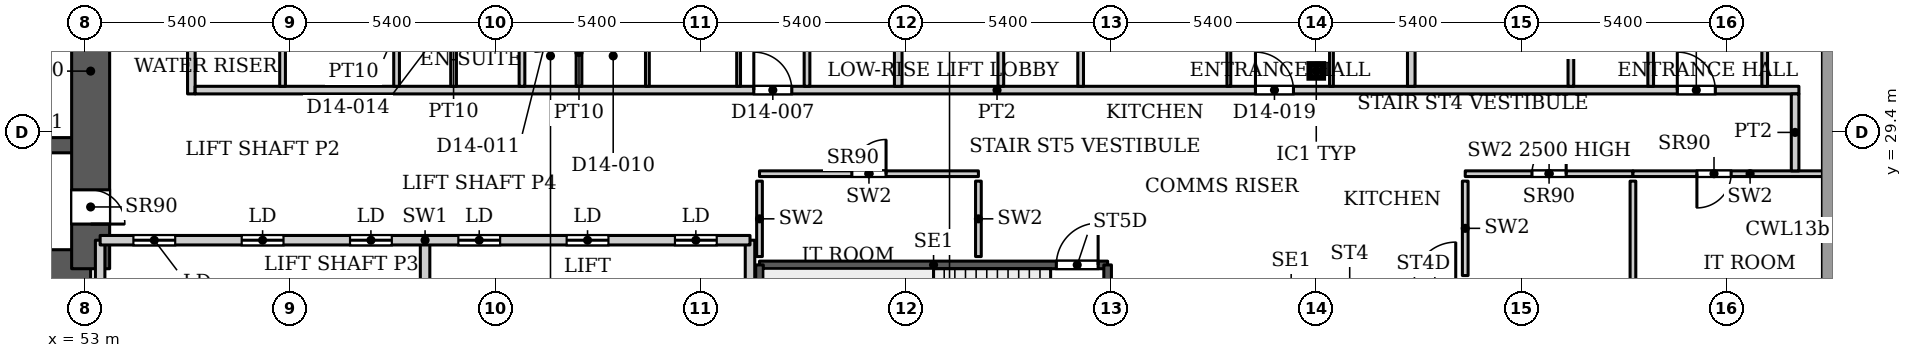
"""IFC4 building model, lengths in metres.
Left out: names, types, materials, properties, quantities, classifications, styles, units other than length and angle.
Written with IfcOpenShell. Run it as: python <this file> out.ifc"""

import sys

from ifc_helpers import new_model, si_unit, direction, frame, frame_2d, origin, origin_2d, place, context, subcontext, project, spatial, rectangle, hollow_rectangle, extrude, source, transform, mapped, element, fill, save


model = new_model("IFC4")
c1 = context("Model", 3, precision=1e-05, world=origin(), true_north=direction((0.0, 1.0)))
c2 = subcontext(c1, "Body", "Model", "MODEL_VIEW")
j1 = project(units=[si_unit("LENGTHUNIT", "METRE"), si_unit("PLANEANGLEUNIT", "RADIAN")], contexts=[c1])
p1 = place(None, origin())
s1 = spatial("IfcSite", under=j1, at=p1, CompositionType="ELEMENT")
p2 = place(p1, origin())
s2 = spatial("IfcBuilding", under=s1, at=p2, CompositionType="ELEMENT")
p3 = place(p2, frame((0.0, 0.0, 69.5)))
s3 = spatial("IfcBuildingStorey", under=s2, at=p3, CompositionType="ELEMENT", Elevation=69.5)
p4 = place(p3, frame((85.4, 31.005, 0.0), z_axis=(0.0, 0.0, 1.0), x_axis=(1.0, 0.0, 0.0)))
e1 = element("IfcColumn", 1, at=p4, inside=s3, PredefinedType="COLUMN", context=c2, shape_type="SweptSolid", body=[
    extrude(hollow_rectangle(XDim=0.356, YDim=0.356, WallThickness=0.016, InnerFilletRadius=0.016, OuterFilletRadius=0.032, at=origin_2d()), origin(), (0.0, 0.0, 1.0), 3.9),
])
p5 = place(p3, frame((34.75, 25.8, 0.0), z_axis=(0.0, 0.0, 1.0), x_axis=(1.0, 0.0, 0.0)))
e2 = element("IfcWall", 2, at=p5, inside=s3, PredefinedType="SHEAR", context=c2, shape_type="SweptSolid", body=[
    extrude(rectangle(XDim=18.4, YDim=1.0, at=frame_2d((9.2, 0.0))), origin(), (0.0, 0.0, 1.0), 3.9),
])
p6 = place(p3, frame((34.75, 29.05, 0.0), z_axis=(0.0, 0.0, 1.0), x_axis=(1.0, 0.0, 0.0)))
e3 = element("IfcWall", 3, at=p6, inside=s3, PredefinedType="SHEAR", context=c2, shape_type="SweptSolid", body=[
    extrude(rectangle(XDim=18.4, YDim=0.4, at=frame_2d((9.2, 0.0))), origin(), (0.0, 0.0, 1.0), 3.9),
])
p7 = place(p6, frame((15.125, 0.0, 0.0)))
e4 = element("IfcOpeningElement", 4, at=p7, cuts=e3, PredefinedType="OPENING", context=c2, shape_type="SweptSolid", body=[
    extrude(rectangle(XDim=1.1, YDim=2.2, at=frame_2d((0.55, 1.1))), frame((0.0, 0.21, 0.0), z_axis=(0.0, -1.0, 0.0), x_axis=(1.0, 0.0, 0.0)), (0.0, 0.0, 1.0), 0.42),
])
p8 = place(p3, frame((53.15, 25.8, 0.0), z_axis=(0.0, 0.0, 1.0), x_axis=(0.0, 1.0, 0.0)))
e5 = element("IfcWall", 5, at=p8, inside=s3, PredefinedType="SHEAR", context=c2, shape_type="SweptSolid", body=[
    extrude(rectangle(XDim=10.4, YDim=1.0, at=frame_2d((5.2, 0.0))), origin(), (0.0, 0.0, 1.0), 3.9),
])
p9 = place(p8, frame((1.175, 0.0, 0.0)))
e6 = element("IfcOpeningElement", 6, at=p9, cuts=e5, PredefinedType="OPENING", context=c2, shape_type="SweptSolid", body=[
    extrude(rectangle(XDim=0.9, YDim=2.2, at=frame_2d((0.45, 1.1))), frame((0.0, 0.51, 0.0), z_axis=(0.0, -1.0, 0.0), x_axis=(1.0, 0.0, 0.0)), (0.0, 0.0, 1.0), 1.02),
])
p10 = place(p3, frame((70.75, 25.9, 0.0), z_axis=(0.0, 0.0, 1.0), x_axis=(1.0, 0.0, 0.0)))
e7 = element("IfcWall", 7, at=p10, inside=s3, PredefinedType="SHEAR", context=c2, shape_type="SweptSolid", body=[
    extrude(rectangle(XDim=9.16, YDim=0.2, at=frame_2d((4.58, 0.0))), origin(), (0.0, 0.0, 1.0), 3.9),
])
p11 = place(p10, frame((7.81, 0.0, 0.0)))
e8 = element("IfcOpeningElement", 8, at=p11, cuts=e7, PredefinedType="OPENING", context=c2, shape_type="SweptSolid", body=[
    extrude(rectangle(XDim=1.1, YDim=2.2, at=frame_2d((0.55, 1.1))), frame((0.0, 0.11, 0.0), z_axis=(0.0, -1.0, 0.0), x_axis=(1.0, 0.0, 0.0)), (0.0, 0.0, 1.0), 0.22),
])
for number, where, z_axis, x_axis in (
    (9, (70.75, 22.75, 0.0), (0.0, 0.0, 1.0), (0.0, 1.0, 0.0)),
    (10, (79.91, 22.75, 0.0), (0.0, 0.0, 1.0), (0.0, 1.0, 0.0)),
):
    element("IfcWall", number, at=place(p3, frame(where, z_axis=z_axis, x_axis=x_axis)), inside=s3, PredefinedType="SHEAR", context=c2, shape_type="SweptSolid", body=[
        extrude(rectangle(XDim=3.15, YDim=0.2, at=frame_2d((1.575, 0.0))), origin(), (0.0, 0.0, 1.0), 3.9),
    ])
for number, where, z_axis, x_axis in (
    (11, (53.4, 23.7, 0.0), (0.0, 0.0, 1.0), (0.0, 1.0, 0.0)),
    (12, (61.95, 23.7, 0.0), (0.0, 0.0, 1.0), (0.0, 1.0, 0.0)),
    (13, (70.5, 23.7, 0.0), (0.0, 0.0, 1.0), (0.0, 1.0, 0.0)),
):
    element("IfcWall", number, at=place(p3, frame(where, z_axis=z_axis, x_axis=x_axis)), inside=s3, PredefinedType="PARTITIONING", context=c2, shape_type="SweptSolid", body=[
        extrude(rectangle(XDim=2.85, YDim=0.25, at=frame_2d((1.425, 0.0))), origin(), (0.0, 0.0, 1.0), 3.9),
    ])
p12 = place(p3, frame((53.4, 26.55, 0.0), z_axis=(0.0, 0.0, 1.0), x_axis=(1.0, 0.0, 0.0)))
e14 = element("IfcWall", 14, at=p12, inside=s3, PredefinedType="PARTITIONING", context=c2, shape_type="SweptSolid", body=[
    extrude(rectangle(XDim=17.1, YDim=0.25, at=frame_2d((8.55, 0.0))), origin(), (0.0, 0.0, 1.0), 3.9),
])
p13 = place(p12, frame((0.875, 0.0, 0.0)))
e15 = element("IfcOpeningElement", 15, at=p13, cuts=e14, PredefinedType="OPENING", context=c2, shape_type="SweptSolid", body=[
    extrude(rectangle(XDim=1.1, YDim=2.2, at=frame_2d((0.55, 1.1))), frame((0.0, 0.135, 0.0), z_axis=(0.0, -1.0, 0.0), x_axis=(1.0, 0.0, 0.0)), (0.0, 0.0, 1.0), 0.27),
])
p14 = place(p12, frame((3.725, 0.0, 0.0)))
e16 = element("IfcOpeningElement", 16, at=p14, cuts=e14, PredefinedType="OPENING", context=c2, shape_type="SweptSolid", body=[
    extrude(rectangle(XDim=1.1, YDim=2.2, at=frame_2d((0.55, 1.1))), frame((0.0, 0.135, 0.0), z_axis=(0.0, -1.0, 0.0), x_axis=(1.0, 0.0, 0.0)), (0.0, 0.0, 1.0), 0.27),
])
p15 = place(p12, frame((6.575, 0.0, 0.0)))
e17 = element("IfcOpeningElement", 17, at=p15, cuts=e14, PredefinedType="OPENING", context=c2, shape_type="SweptSolid", body=[
    extrude(rectangle(XDim=1.1, YDim=2.2, at=frame_2d((0.55, 1.1))), frame((0.0, 0.135, 0.0), z_axis=(0.0, -1.0, 0.0), x_axis=(1.0, 0.0, 0.0)), (0.0, 0.0, 1.0), 0.27),
])
p16 = place(p12, frame((9.425, 0.0, 0.0)))
e18 = element("IfcOpeningElement", 18, at=p16, cuts=e14, PredefinedType="OPENING", context=c2, shape_type="SweptSolid", body=[
    extrude(rectangle(XDim=1.1, YDim=2.2, at=frame_2d((0.55, 1.1))), frame((0.0, 0.135, 0.0), z_axis=(0.0, -1.0, 0.0), x_axis=(1.0, 0.0, 0.0)), (0.0, 0.0, 1.0), 0.27),
])
p17 = place(p12, frame((12.275, 0.0, 0.0)))
e19 = element("IfcOpeningElement", 19, at=p17, cuts=e14, PredefinedType="OPENING", context=c2, shape_type="SweptSolid", body=[
    extrude(rectangle(XDim=1.1, YDim=2.2, at=frame_2d((0.55, 1.1))), frame((0.0, 0.135, 0.0), z_axis=(0.0, -1.0, 0.0), x_axis=(1.0, 0.0, 0.0)), (0.0, 0.0, 1.0), 0.27),
])
p18 = place(p12, frame((15.125, 0.0, 0.0)))
e20 = element("IfcOpeningElement", 20, at=p18, cuts=e14, PredefinedType="OPENING", context=c2, shape_type="SweptSolid", body=[
    extrude(rectangle(XDim=1.1, YDim=2.2, at=frame_2d((0.55, 1.1))), frame((0.0, 0.135, 0.0), z_axis=(0.0, -1.0, 0.0), x_axis=(1.0, 0.0, 0.0)), (0.0, 0.0, 1.0), 0.27),
])
p19 = place(p3, frame((70.75, 28.3, 0.0), z_axis=(0.0, 0.0, 1.0), x_axis=(1.0, 0.0, 0.0)))
e21 = element("IfcWall", 21, at=p19, inside=s3, PredefinedType="PARTITIONING", context=c2, shape_type="SweptSolid", body=[
    extrude(rectangle(XDim=5.76, YDim=0.15, at=frame_2d((2.88, 0.0))), origin(), (0.0, 0.0, 1.0), 3.9),
])
p20 = place(p19, frame((2.43, 0.0, 0.0)))
e22 = element("IfcOpeningElement", 22, at=p20, cuts=e21, PredefinedType="OPENING", context=c2, shape_type="SweptSolid", body=[
    extrude(rectangle(XDim=0.9, YDim=2.2, at=frame_2d((0.45, 1.1))), frame((0.0, 0.085, 0.0), z_axis=(0.0, -1.0, 0.0), x_axis=(1.0, 0.0, 0.0)), (0.0, 0.0, 1.0), 0.17),
])
for number, where, z_axis, x_axis in (
    (23, (70.75, 26.12, 0.0), (0.0, 0.0, 1.0), (0.0, 1.0, 0.0)),
    (24, (76.51, 26.12, 0.0), (0.0, 0.0, 1.0), (0.0, 1.0, 0.0)),
):
    element("IfcWall", number, at=place(p3, frame(where, z_axis=z_axis, x_axis=x_axis)), inside=s3, PredefinedType="PARTITIONING", context=c2, shape_type="SweptSolid", body=[
        extrude(rectangle(XDim=1.985, YDim=0.15, at=frame_2d((0.992, 0.0))), origin(), (0.0, 0.0, 1.0), 3.9),
    ])
p21 = place(p3, frame((89.32, 28.3, 0.0), z_axis=(0.0, 0.0, 1.0), x_axis=(1.0, 0.0, 0.0)))
e25 = element("IfcWall", 25, at=p21, inside=s3, PredefinedType="PARTITIONING", context=c2, shape_type="SweptSolid", body=[
    extrude(rectangle(XDim=4.413, YDim=0.15, at=frame_2d((2.207, 0.0))), origin(), (0.0, 0.0, 1.0), 2.5),
])
p22 = place(p21, frame((1.756, 0.0, 0.0)))
e26 = element("IfcOpeningElement", 26, at=p22, cuts=e25, PredefinedType="OPENING", context=c2, shape_type="SweptSolid", body=[
    extrude(rectangle(XDim=0.9, YDim=2.2, at=frame_2d((0.45, 1.1))), frame((0.0, 0.085, 0.0), z_axis=(0.0, -1.0, 0.0), x_axis=(1.0, 0.0, 0.0)), (0.0, 0.0, 1.0), 0.17),
])
p23 = place(p3, frame((89.32, 25.62, 0.0), z_axis=(0.0, 0.0, 1.0), x_axis=(0.0, 1.0, 0.0)))
e27 = element("IfcWall", 27, at=p23, inside=s3, PredefinedType="PARTITIONING", context=c2, shape_type="SweptSolid", body=[
    extrude(rectangle(XDim=2.485, YDim=0.15, at=frame_2d((1.242, 0.0))), origin(), (0.0, 0.0, 1.0), 3.9),
])
p24 = place(p3, frame((93.733, 21.338, 0.0), z_axis=(0.0, 0.0, 1.0), x_axis=(0.0, 1.0, 0.0)))
e28 = element("IfcWall", 28, at=p24, inside=s3, PredefinedType="PARTITIONING", context=c2, shape_type="SweptSolid", body=[
    extrude(rectangle(XDim=6.767, YDim=0.15, at=frame_2d((3.384, 0.0))), origin(), (0.0, 0.0, 1.0), 3.9),
])
p25 = place(p3, frame((93.733, 28.3, 0.0), z_axis=(0.0, 0.0, 1.0), x_axis=(1.0, 0.0, 0.0)))
e29 = element("IfcWall", 29, at=p25, inside=s3, PredefinedType="PARTITIONING", context=c2, shape_type="SweptSolid", body=[
    extrude(rectangle(XDim=6.165, YDim=0.15, at=frame_2d((3.083, 0.0))), origin(), (0.0, 0.0, 1.0), 3.9),
])
p26 = place(p25, frame((1.683, 0.0, 0.0)))
e30 = element("IfcOpeningElement", 30, at=p26, cuts=e29, PredefinedType="OPENING", context=c2, shape_type="SweptSolid", body=[
    extrude(rectangle(XDim=0.9, YDim=2.2, at=frame_2d((0.45, 1.1))), frame((0.0, 0.085, 0.0), z_axis=(0.0, -1.0, 0.0), x_axis=(1.0, 0.0, 0.0)), (0.0, 0.0, 1.0), 0.17),
])
p27 = place(p3, frame((55.8, 30.4, 0.0), z_axis=(0.0, 0.0, 1.0), x_axis=(0.0, 1.0, 0.0)))
e31 = element("IfcWall", 31, at=p27, inside=s3, PredefinedType="PARTITIONING", context=c2, shape_type="SweptSolid", body=[
    extrude(rectangle(XDim=13.5, YDim=0.2, at=frame_2d((6.75, 0.0))), origin(), (0.0, 0.0, 1.0), 3.6),
])
p28 = place(p3, frame((55.9, 30.5, 0.0), z_axis=(0.0, 0.0, 1.0), x_axis=(1.0, 0.0, 0.0)))
e32 = element("IfcWall", 32, at=p28, inside=s3, PredefinedType="PARTITIONING", context=c2, shape_type="SweptSolid", body=[
    extrude(rectangle(XDim=42.2, YDim=0.2, at=frame_2d((21.1, 0.0))), origin(), (0.0, 0.0, 1.0), 3.6),
])
p29 = place(p28, frame((14.7, 0.0, 0.0)))
e33 = element("IfcOpeningElement", 33, at=p29, cuts=e32, PredefinedType="OPENING", context=c2, shape_type="SweptSolid", body=[
    extrude(rectangle(XDim=1.0, YDim=2.1, at=frame_2d((0.5, 1.05))), frame((0.0, 0.11, 0.0), z_axis=(0.0, -1.0, 0.0), x_axis=(1.0, 0.0, 0.0)), (0.0, 0.0, 1.0), 0.22),
])
p30 = place(p28, frame((27.9, 0.0, 0.0)))
e34 = element("IfcOpeningElement", 34, at=p30, cuts=e32, PredefinedType="OPENING", context=c2, shape_type="SweptSolid", body=[
    extrude(rectangle(XDim=1.0, YDim=2.1, at=frame_2d((0.5, 1.05))), frame((0.0, 0.11, 0.0), z_axis=(0.0, -1.0, 0.0), x_axis=(1.0, 0.0, 0.0)), (0.0, 0.0, 1.0), 0.22),
])
p31 = place(p28, frame((39.0, 0.0, 0.0)))
e35 = element("IfcOpeningElement", 35, at=p31, cuts=e32, PredefinedType="OPENING", context=c2, shape_type="SweptSolid", body=[
    extrude(rectangle(XDim=1.0, YDim=2.1, at=frame_2d((0.5, 1.05))), frame((0.0, 0.11, 0.0), z_axis=(0.0, -1.0, 0.0), x_axis=(1.0, 0.0, 0.0)), (0.0, 0.0, 1.0), 0.22),
])
p32 = place(p3, frame((58.2, 30.6, 0.0), z_axis=(0.0, 0.0, 1.0), x_axis=(0.0, 1.0, 0.0)))
e36 = element("IfcWall", 36, at=p32, inside=s3, PredefinedType="PARTITIONING", context=c2, shape_type="SweptSolid", body=[
    extrude(rectangle(XDim=3.025, YDim=0.15, at=frame_2d((1.512, 0.0))), origin(), (0.0, 0.0, 1.0), 3.072),
])
for number, where, z_axis, x_axis in (
    (37, (61.2, 30.6, 0.0), (0.0, 0.0, 1.0), (0.0, 1.0, 0.0)),
    (38, (62.7, 30.6, 0.0), (0.0, 0.0, 1.0), (0.0, 1.0, 0.0)),
    (39, (64.5, 30.6, 0.0), (0.0, 0.0, 1.0), (0.0, 1.0, 0.0)),
):
    element("IfcWall", number, at=place(p3, frame(where, z_axis=z_axis, x_axis=x_axis)), inside=s3, PredefinedType="PARTITIONING", context=c2, shape_type="SweptSolid", body=[
        extrude(rectangle(XDim=3.025, YDim=0.15, at=frame_2d((1.512, 0.0))), origin(), (0.0, 0.0, 1.0), 3.6),
    ])
p33 = place(p3, frame((66.0, 30.6, 0.0), z_axis=(0.0, 0.0, 1.0), x_axis=(0.0, 1.0, 0.0)))
e40 = element("IfcWall", 40, at=p33, inside=s3, PredefinedType="PARTITIONING", context=c2, shape_type="SweptSolid", body=[
    extrude(rectangle(XDim=1.775, YDim=0.15, at=frame_2d((0.887, 0.0))), origin(), (0.0, 0.0, 1.0), 3.6),
])
for number, where, z_axis, x_axis in (
    (41, (67.8, 30.6, 0.0), (0.0, 0.0, 1.0), (0.0, 1.0, 0.0)),
    (42, (70.2, 30.6, 0.0), (0.0, 0.0, 1.0), (0.0, 1.0, 0.0)),
):
    element("IfcWall", number, at=place(p3, frame(where, z_axis=z_axis, x_axis=x_axis)), inside=s3, PredefinedType="PARTITIONING", context=c2, shape_type="SweptSolid", body=[
        extrude(rectangle(XDim=3.025, YDim=0.1, at=frame_2d((1.512, 0.0))), origin(), (0.0, 0.0, 1.0), 3.6),
    ])
p34 = place(p3, frame((72.0, 30.6, 0.0), z_axis=(0.0, 0.0, 1.0), x_axis=(0.0, 1.0, 0.0)))
e43 = element("IfcWall", 43, at=p34, inside=s3, PredefinedType="PARTITIONING", context=c2, shape_type="SweptSolid", body=[
    extrude(rectangle(XDim=3.175, YDim=0.15, at=frame_2d((1.587, 0.0))), origin(), (0.0, 0.0, 1.0), 3.6),
])
p35 = place(p3, frame((74.4, 30.6, 0.0), z_axis=(0.0, 0.0, 1.0), x_axis=(0.0, 1.0, 0.0)))
e44 = element("IfcWall", 44, at=p35, inside=s3, PredefinedType="PARTITIONING", context=c2, shape_type="SweptSolid", body=[
    extrude(rectangle(XDim=13.3, YDim=0.2, at=frame_2d((6.65, 0.0))), origin(), (0.0, 0.0, 1.0), 3.6),
])
for number, where, z_axis, x_axis in (
    (45, (77.1, 30.6, 0.0), (0.0, 0.0, 1.0), (0.0, 1.0, 0.0)),
    (46, (79.2, 30.6, 0.0), (0.0, 0.0, 1.0), (0.0, 1.0, 0.0)),
):
    element("IfcWall", number, at=place(p3, frame(where, z_axis=z_axis, x_axis=x_axis)), inside=s3, PredefinedType="PARTITIONING", context=c2, shape_type="SweptSolid", body=[
        extrude(rectangle(XDim=3.025, YDim=0.15, at=frame_2d((1.512, 0.0))), origin(), (0.0, 0.0, 1.0), 3.6),
    ])
for number, where, z_axis, x_axis in (
    (47, (83.1, 30.6, 0.0), (0.0, 0.0, 1.0), (0.0, 1.0, 0.0)),
    (48, (85.8, 30.6, 0.0), (0.0, 0.0, 1.0), (0.0, 1.0, 0.0)),
):
    element("IfcWall", number, at=place(p3, frame(where, z_axis=z_axis, x_axis=x_axis)), inside=s3, PredefinedType="PARTITIONING", context=c2, shape_type="SweptSolid", body=[
        extrude(rectangle(XDim=3.025, YDim=0.1, at=frame_2d((1.512, 0.0))), origin(), (0.0, 0.0, 1.0), 3.6),
    ])
p36 = place(p3, frame((87.9, 30.6, 0.0), z_axis=(0.0, 0.0, 1.0), x_axis=(0.0, 1.0, 0.0)))
e49 = element("IfcWall", 49, at=p36, inside=s3, PredefinedType="PARTITIONING", context=c2, shape_type="SweptSolid", body=[
    extrude(rectangle(XDim=13.3, YDim=0.2, at=frame_2d((6.65, 0.0))), origin(), (0.0, 0.0, 1.0), 3.6),
])
for number, where, z_axis, x_axis in (
    (50, (92.1, 30.6, 0.0), (0.0, 0.0, 1.0), (0.0, 1.0, 0.0)),
    (51, (94.2, 30.6, 0.0), (0.0, 0.0, 1.0), (0.0, 1.0, 0.0)),
):
    element("IfcWall", number, at=place(p3, frame(where, z_axis=z_axis, x_axis=x_axis)), inside=s3, PredefinedType="PARTITIONING", context=c2, shape_type="SweptSolid", body=[
        extrude(rectangle(XDim=3.025, YDim=0.15, at=frame_2d((1.512, 0.0))), origin(), (0.0, 0.0, 1.0), 3.6),
    ])
p37 = place(p3, frame((97.2, 30.6, 0.0), z_axis=(0.0, 0.0, 1.0), x_axis=(0.0, 1.0, 0.0)))
e52 = element("IfcWall", 52, at=p37, inside=s3, PredefinedType="PARTITIONING", context=c2, shape_type="SweptSolid", body=[
    extrude(rectangle(XDim=3.175, YDim=0.15, at=frame_2d((1.587, 0.0))), origin(), (0.0, 0.0, 1.0), 3.6),
])
p38 = place(p3, frame((98.0, 28.374, 0.0), z_axis=(0.0, 0.0, 1.0), x_axis=(0.0, 1.0, 0.0)))
e53 = element("IfcWall", 53, at=p38, inside=s3, PredefinedType="PARTITIONING", context=c2, shape_type="SweptSolid", body=[
    extrude(rectangle(XDim=2.026, YDim=0.2, at=frame_2d((1.013, 0.0))), origin(), (0.0, 0.0, 1.0), 3.6),
])
m1 = source(origin(), c2, "Body", "SweptSolid", [
    extrude(rectangle(XDim=1.1, YDim=2.2, at=frame_2d((0.55, 1.1))), frame((0.0, 0.025, 0.0), z_axis=(0.0, -1.0, 0.0), x_axis=(1.0, 0.0, 0.0)), (0.0, 0.0, 1.0), 0.05),
])
p39 = place(p13, origin())
e54 = element("IfcDoor", 54, at=p39, inside=s3, OperationType="SLIDING_TO_LEFT", PredefinedType="DOOR", context=c2, shape_type="MappedRepresentation", body=[
    mapped(m1, transform((0.0, 0.0, 0.0), x_axis=(1.0, 0.0, 0.0), y_axis=(0.0, 1.0, 0.0), z_axis=(0.0, 0.0, 1.0), scale=1.0)),
])
fill(e15, e54)
p40 = place(p14, origin())
e55 = element("IfcDoor", 55, at=p40, inside=s3, OperationType="SLIDING_TO_LEFT", PredefinedType="DOOR", context=c2, shape_type="MappedRepresentation", body=[
    mapped(m1, transform((0.0, 0.0, 0.0), x_axis=(1.0, 0.0, 0.0), y_axis=(0.0, 1.0, 0.0), z_axis=(0.0, 0.0, 1.0), scale=1.0)),
])
fill(e16, e55)
p41 = place(p15, origin())
e56 = element("IfcDoor", 56, at=p41, inside=s3, OperationType="SLIDING_TO_LEFT", PredefinedType="DOOR", context=c2, shape_type="MappedRepresentation", body=[
    mapped(m1, transform((0.0, 0.0, 0.0), x_axis=(1.0, 0.0, 0.0), y_axis=(0.0, 1.0, 0.0), z_axis=(0.0, 0.0, 1.0), scale=1.0)),
])
fill(e17, e56)
p42 = place(p16, origin())
e57 = element("IfcDoor", 57, at=p42, inside=s3, OperationType="SLIDING_TO_LEFT", PredefinedType="DOOR", context=c2, shape_type="MappedRepresentation", body=[
    mapped(m1, transform((0.0, 0.0, 0.0), x_axis=(1.0, 0.0, 0.0), y_axis=(0.0, 1.0, 0.0), z_axis=(0.0, 0.0, 1.0), scale=1.0)),
])
fill(e18, e57)
p43 = place(p17, origin())
e58 = element("IfcDoor", 58, at=p43, inside=s3, OperationType="SLIDING_TO_LEFT", PredefinedType="DOOR", context=c2, shape_type="MappedRepresentation", body=[
    mapped(m1, transform((0.0, 0.0, 0.0), x_axis=(1.0, 0.0, 0.0), y_axis=(0.0, 1.0, 0.0), z_axis=(0.0, 0.0, 1.0), scale=1.0)),
])
fill(e19, e58)
p44 = place(p18, origin())
e59 = element("IfcDoor", 59, at=p44, inside=s3, OperationType="SLIDING_TO_LEFT", PredefinedType="DOOR", context=c2, shape_type="MappedRepresentation", body=[
    mapped(m1, transform((0.0, 0.0, 0.0), x_axis=(1.0, 0.0, 0.0), y_axis=(0.0, 1.0, 0.0), z_axis=(0.0, 0.0, 1.0), scale=1.0)),
])
fill(e20, e59)
m2 = source(origin(), c2, "Body", "SweptSolid", [
    extrude(rectangle(XDim=0.9, YDim=2.2, at=frame_2d((0.45, 1.1))), frame((0.0, 0.025, 0.0), z_axis=(0.0, -1.0, 0.0), x_axis=(1.0, 0.0, 0.0)), (0.0, 0.0, 1.0), 0.05),
])
p45 = place(p9, origin())
e60 = element("IfcDoor", 60, at=p45, inside=s3, OperationType="SINGLE_SWING_RIGHT", PredefinedType="DOOR", context=c2, shape_type="MappedRepresentation", body=[
    mapped(m2, transform((0.0, 0.0, 0.0), x_axis=(1.0, 0.0, 0.0), y_axis=(0.0, 1.0, 0.0), z_axis=(0.0, 0.0, 1.0), scale=1.0)),
])
fill(e6, e60)
p46 = place(p20, origin())
e61 = element("IfcDoor", 61, at=p46, inside=s3, OperationType="SINGLE_SWING_LEFT", PredefinedType="DOOR", context=c2, shape_type="MappedRepresentation", body=[
    mapped(m2, transform((0.0, 0.0, 0.0), x_axis=(1.0, 0.0, 0.0), y_axis=(0.0, 1.0, 0.0), z_axis=(0.0, 0.0, 1.0), scale=1.0)),
])
fill(e22, e61)
p47 = place(p22, origin())
e62 = element("IfcDoor", 62, at=p47, inside=s3, OperationType="SINGLE_SWING_LEFT", PredefinedType="DOOR", context=c2, shape_type="MappedRepresentation", body=[
    mapped(m2, transform((0.0, 0.0, 0.0), x_axis=(1.0, 0.0, 0.0), y_axis=(0.0, 1.0, 0.0), z_axis=(0.0, 0.0, 1.0), scale=1.0)),
])
fill(e26, e62)
p48 = place(p26, origin())
e63 = element("IfcDoor", 63, at=p48, inside=s3, OperationType="SINGLE_SWING_RIGHT", PredefinedType="DOOR", context=c2, shape_type="MappedRepresentation", body=[
    mapped(m2, transform((0.0, 0.0, 0.0), x_axis=(1.0, 0.0, 0.0), y_axis=(0.0, 1.0, 0.0), z_axis=(0.0, 0.0, 1.0), scale=1.0)),
])
fill(e30, e63)
m3 = source(origin(), c2, "Body", "SweptSolid", [
    extrude(rectangle(XDim=1.1, YDim=2.2, at=frame_2d((0.55, 1.1))), frame((0.0, 0.025, 0.0), z_axis=(0.0, -1.0, 0.0), x_axis=(1.0, 0.0, 0.0)), (0.0, 0.0, 1.0), 0.05),
])
p49 = place(p11, origin())
e64 = element("IfcDoor", 64, at=p49, inside=s3, OperationType="SINGLE_SWING_LEFT", PredefinedType="DOOR", context=c2, shape_type="MappedRepresentation", body=[
    mapped(m3, transform((0.0, 0.0, 0.0), x_axis=(1.0, 0.0, 0.0), y_axis=(0.0, 1.0, 0.0), z_axis=(0.0, 0.0, 1.0), scale=1.0)),
])
fill(e8, e64)
m4 = source(origin(), c2, "Body", "SweptSolid", [
    extrude(rectangle(XDim=1.0, YDim=2.1, at=frame_2d((0.5, 1.05))), frame((0.0, 0.025, 0.0), z_axis=(0.0, -1.0, 0.0), x_axis=(1.0, 0.0, 0.0)), (0.0, 0.0, 1.0), 0.05),
])
p50 = place(p29, origin())
e65 = element("IfcDoor", 65, at=p50, inside=s3, OperationType="SINGLE_SWING_LEFT", PredefinedType="DOOR", context=c2, shape_type="MappedRepresentation", body=[
    mapped(m4, transform((0.0, 0.0, 0.0), x_axis=(1.0, 0.0, 0.0), y_axis=(0.0, 1.0, 0.0), z_axis=(0.0, 0.0, 1.0), scale=1.0)),
])
fill(e33, e65)
p51 = place(p30, origin())
e66 = element("IfcDoor", 66, at=p51, inside=s3, OperationType="SINGLE_SWING_LEFT", PredefinedType="DOOR", context=c2, shape_type="MappedRepresentation", body=[
    mapped(m4, transform((0.0, 0.0, 0.0), x_axis=(1.0, 0.0, 0.0), y_axis=(0.0, 1.0, 0.0), z_axis=(0.0, 0.0, 1.0), scale=1.0)),
])
fill(e34, e66)
p52 = place(p31, origin())
e67 = element("IfcDoor", 67, at=p52, inside=s3, OperationType="SINGLE_SWING_LEFT", PredefinedType="DOOR", context=c2, shape_type="MappedRepresentation", body=[
    mapped(m4, transform((0.0, 0.0, 0.0), x_axis=(1.0, 0.0, 0.0), y_axis=(0.0, 1.0, 0.0), z_axis=(0.0, 0.0, 1.0), scale=1.0)),
])
fill(e35, e67)
save(model, sys.argv[1])
